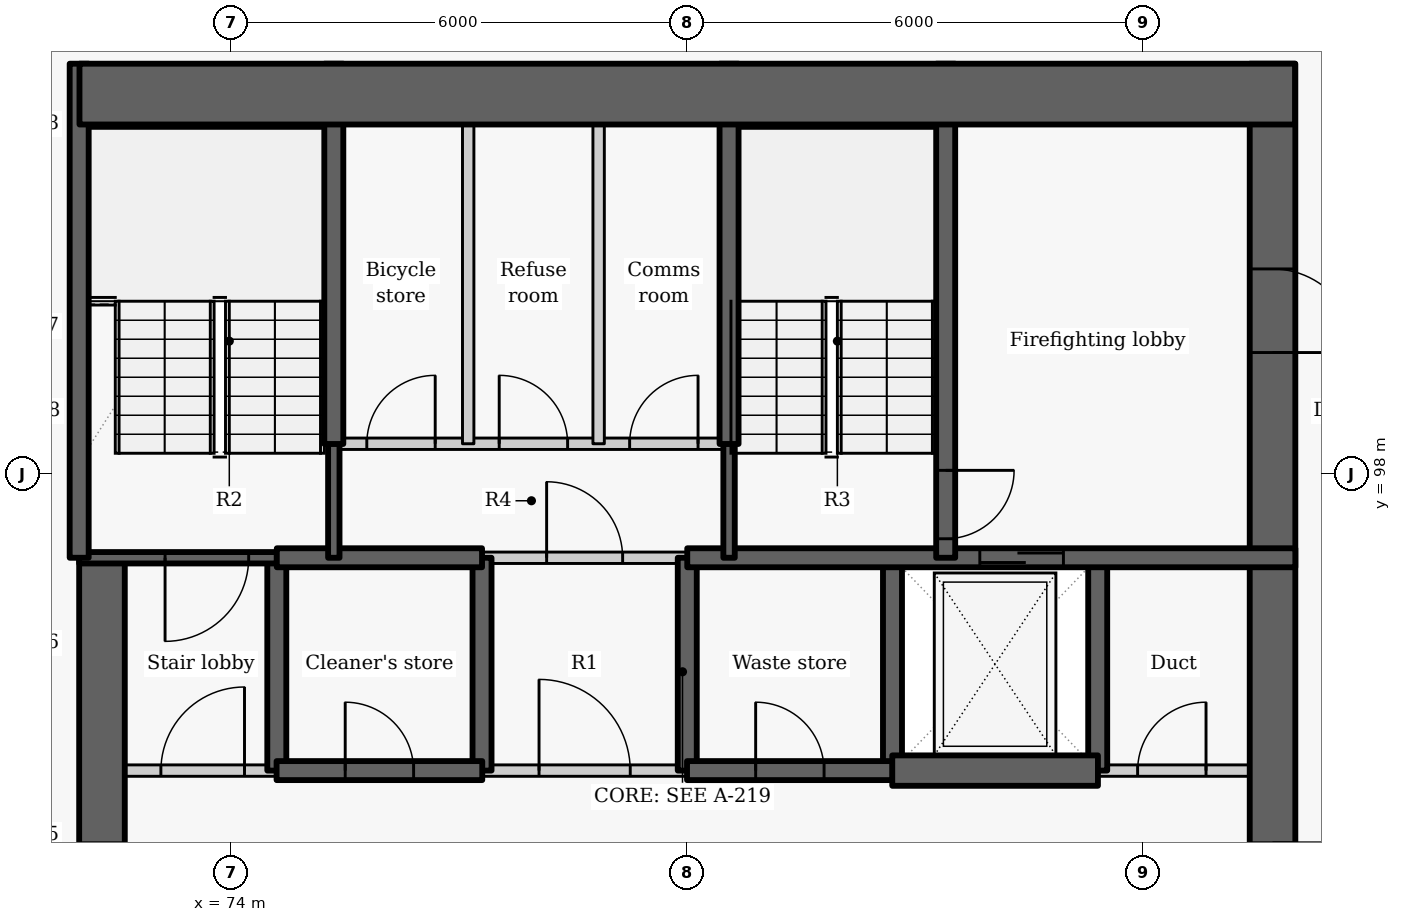
"""IFC4 building model, lengths in metres.
Left out: names, types, materials, properties, quantities, classifications, styles, units other than length and angle.
Written with IfcOpenShell. Run it as: python <this file> out.ifc"""

import sys

from ifc_helpers import new_model, si_unit, direction, frame, frame_2d, origin, place, context, subcontext, project, spatial, rectangle, extrude, element, fill, save


model = new_model("IFC4")
c1 = context("Model", 3, precision=1e-05, world=origin(), true_north=direction((0.0, 1.0)))
c2 = subcontext(c1, "Body", "Model", "MODEL_VIEW")
j1 = project(units=[si_unit("LENGTHUNIT", "METRE"), si_unit("PLANEANGLEUNIT", "RADIAN")], contexts=[c1])
p1 = place(None, origin())
s1 = spatial("IfcSite", under=j1, at=p1, CompositionType="ELEMENT")
p2 = place(p1, origin())
s2 = spatial("IfcBuilding", under=s1, at=p2, CompositionType="ELEMENT")
p3 = place(p2, frame((0.0, 0.0, 97.5)))
s3 = spatial("IfcBuildingStorey", under=s2, at=p3, CompositionType="ELEMENT", Elevation=97.5)
p4 = place(p3, frame((74.6, 94.1, -0.275), z_axis=(0.0, 0.0, 1.0), x_axis=(0.0, 1.0, 0.0)))
e1 = element("IfcWall", 1, at=p4, inside=s3, PredefinedType="SHEAR", context=c2, shape_type="SweptSolid", body=[
    extrude(rectangle(XDim=2.8, YDim=0.25, at=frame_2d((1.4, 0.0))), origin(), (0.0, 0.0, 1.0), 3.3),
])
p5 = place(p3, frame((72.3, 87.8, -0.275), z_axis=(0.0, 0.0, 1.0), x_axis=(0.0, 1.0, 0.0)))
e2 = element("IfcWall", 2, at=p5, inside=s3, PredefinedType="SHEAR", context=c2, shape_type="SweptSolid", body=[
    extrude(rectangle(XDim=9.1, YDim=0.6, at=frame_2d((4.55, 0.0))), origin(), (0.0, 0.0, 1.0), 3.3),
])
p6 = place(p5, frame((3.85, 0.0, 0.275)))
e3 = element("IfcOpeningElement", 3, at=p6, cuts=e2, PredefinedType="OPENING", context=c2, shape_type="SweptSolid", body=[
    extrude(rectangle(XDim=1.5, YDim=2.1, at=frame_2d((0.75, 1.05))), frame((0.0, 0.31, 0.0), z_axis=(0.0, -1.0, 0.0), x_axis=(1.0, 0.0, 0.0)), (0.0, 0.0, 1.0), 0.62),
])
for number, where, z_axis, x_axis in (
    (4, (77.3, 94.1, -0.275), (0.0, 0.0, 1.0), (0.0, 1.0, 0.0)),
    (5, (80.0, 94.1, -0.275), (0.0, 0.0, 1.0), (0.0, 1.0, 0.0)),
    (6, (82.7, 94.1, -0.275), (0.0, 0.0, 1.0), (0.0, 1.0, 0.0)),
    (7, (85.4, 94.1, -0.275), (0.0, 0.0, 1.0), (0.0, 1.0, 0.0)),
):
    element("IfcWall", number, at=place(p3, frame(where, z_axis=z_axis, x_axis=x_axis)), inside=s3, PredefinedType="SHEAR", context=c2, shape_type="SweptSolid", body=[
        extrude(rectangle(XDim=2.8, YDim=0.25, at=frame_2d((1.4, 0.0))), origin(), (0.0, 0.0, 1.0), 3.3),
    ])
p7 = place(p3, frame((87.7, 103.4, -0.275), z_axis=(0.0, 0.0, 1.0), x_axis=(0.0, -1.0, 0.0)))
e8 = element("IfcWall", 8, at=p7, inside=s3, PredefinedType="SHEAR", context=c2, shape_type="SweptSolid", body=[
    extrude(rectangle(XDim=15.6, YDim=0.6, at=frame_2d((7.8, 0.0))), origin(), (0.0, 0.0, 1.0), 3.3),
])
p8 = place(p7, frame((10.25, 0.0, 0.275)))
e9 = element("IfcOpeningElement", 9, at=p8, cuts=e8, PredefinedType="OPENING", context=c2, shape_type="SweptSolid", body=[
    extrude(rectangle(XDim=1.5, YDim=2.1, at=frame_2d((0.75, 1.05))), frame((0.0, 0.31, 0.0), z_axis=(0.0, -1.0, 0.0), x_axis=(1.0, 0.0, 0.0)), (0.0, 0.0, 1.0), 0.62),
])
p9 = place(p7, frame((2.7, 0.0, 0.275)))
e10 = element("IfcOpeningElement", 10, at=p9, cuts=e8, PredefinedType="OPENING", context=c2, shape_type="SweptSolid", body=[
    extrude(rectangle(XDim=1.1, YDim=2.1, at=frame_2d((0.55, 1.05))), frame((0.0, 0.31, 0.0), z_axis=(0.0, -1.0, 0.0), x_axis=(1.0, 0.0, 0.0)), (0.0, 0.0, 1.0), 0.62),
])
p10 = place(p3, frame((72.0, 94.1, 0.0), z_axis=(0.0, 0.0, 1.0), x_axis=(1.0, 0.0, 0.0)))
e11 = element("IfcWall", 11, at=p10, inside=s3, PredefinedType="PARTITIONING", context=c2, shape_type="SweptSolid", body=[
    extrude(rectangle(XDim=2.603, YDim=0.15, at=frame_2d((1.302, 0.0))), origin(), (0.0, 0.0, 1.0), 3.025),
])
p11 = place(p10, frame((1.075, 0.0, 0.0)))
e12 = element("IfcOpeningElement", 12, at=p11, cuts=e11, PredefinedType="OPENING", context=c2, shape_type="SweptSolid", body=[
    extrude(rectangle(XDim=1.1, YDim=2.1, at=frame_2d((0.55, 1.05))), frame((0.0, 0.085, 0.0), z_axis=(0.0, -1.0, 0.0), x_axis=(1.0, 0.0, 0.0)), (0.0, 0.0, 1.0), 0.17),
])
p12 = place(p3, frame((77.297, 94.1, 0.0), z_axis=(0.0, 0.0, 1.0), x_axis=(1.0, 0.0, 0.0)))
e13 = element("IfcWall", 13, at=p12, inside=s3, PredefinedType="PARTITIONING", context=c2, shape_type="SweptSolid", body=[
    extrude(rectangle(XDim=2.706, YDim=0.15, at=frame_2d((1.353, 0.0))), origin(), (0.0, 0.0, 1.0), 3.025),
])
p13 = place(p12, frame((0.753, 0.0, 0.0)))
e14 = element("IfcOpeningElement", 14, at=p13, cuts=e13, PredefinedType="OPENING", context=c2, shape_type="SweptSolid", body=[
    extrude(rectangle(XDim=1.2, YDim=2.1, at=frame_2d((0.6, 1.05))), frame((0.0, 0.085, 0.0), z_axis=(0.0, -1.0, 0.0), x_axis=(1.0, 0.0, 0.0)), (0.0, 0.0, 1.0), 0.17),
])
p14 = place(p3, frame((85.397, 94.1, 0.0), z_axis=(0.0, 0.0, 1.0), x_axis=(1.0, 0.0, 0.0)))
e15 = element("IfcWall", 15, at=p14, inside=s3, PredefinedType="PARTITIONING", context=c2, shape_type="SweptSolid", body=[
    extrude(rectangle(XDim=2.603, YDim=0.15, at=frame_2d((1.302, 0.0))), origin(), (0.0, 0.0, 1.0), 3.025),
])
p15 = place(p14, frame((0.528, 0.0, 0.0)))
e16 = element("IfcOpeningElement", 16, at=p15, cuts=e15, PredefinedType="OPENING", context=c2, shape_type="SweptSolid", body=[
    extrude(rectangle(XDim=0.9, YDim=2.1, at=frame_2d((0.45, 1.05))), frame((0.0, 0.085, 0.0), z_axis=(0.0, -1.0, 0.0), x_axis=(1.0, 0.0, 0.0)), (0.0, 0.0, 1.0), 0.17),
])
p16 = place(p3, frame((74.597, 94.1, -0.275), z_axis=(0.0, 0.0, 1.0), x_axis=(1.0, 0.0, 0.0)))
e17 = element("IfcWall", 17, at=p16, inside=s3, PredefinedType="SHEAR", context=c2, shape_type="SweptSolid", body=[
    extrude(rectangle(XDim=2.706, YDim=0.25, at=frame_2d((1.353, 0.0))), origin(), (0.0, 0.0, 1.0), 3.3),
])
p17 = place(p16, frame((0.903, 0.0, 0.275)))
e18 = element("IfcOpeningElement", 18, at=p17, cuts=e17, PredefinedType="OPENING", context=c2, shape_type="SweptSolid", body=[
    extrude(rectangle(XDim=0.9, YDim=2.1, at=frame_2d((0.45, 1.05))), frame((0.0, 0.135, 0.0), z_axis=(0.0, -1.0, 0.0), x_axis=(1.0, 0.0, 0.0)), (0.0, 0.0, 1.0), 0.27),
])
p18 = place(p3, frame((79.997, 94.1, -0.275), z_axis=(0.0, 0.0, 1.0), x_axis=(1.0, 0.0, 0.0)))
e19 = element("IfcWall", 19, at=p18, inside=s3, PredefinedType="SHEAR", context=c2, shape_type="SweptSolid", body=[
    extrude(rectangle(XDim=2.706, YDim=0.25, at=frame_2d((1.353, 0.0))), origin(), (0.0, 0.0, 1.0), 3.3),
])
p19 = place(p18, frame((0.903, 0.0, 0.275)))
e20 = element("IfcOpeningElement", 20, at=p19, cuts=e19, PredefinedType="OPENING", context=c2, shape_type="SweptSolid", body=[
    extrude(rectangle(XDim=0.9, YDim=2.1, at=frame_2d((0.45, 1.05))), frame((0.0, 0.135, 0.0), z_axis=(0.0, -1.0, 0.0), x_axis=(1.0, 0.0, 0.0)), (0.0, 0.0, 1.0), 0.27),
])
p20 = place(p3, frame((82.697, 94.1, -0.275), z_axis=(0.0, 0.0, 1.0), x_axis=(1.0, 0.0, 0.0)))
e21 = element("IfcWall", 21, at=p20, inside=s3, PredefinedType="SHEAR", context=c2, shape_type="SweptSolid", body=[
    extrude(rectangle(XDim=2.706, YDim=0.4, at=frame_2d((1.353, 0.0))), origin(), (0.0, 0.0, 1.0), 3.3),
])
p21 = place(p3, frame((74.6, 96.9, -0.275), z_axis=(0.0, 0.0, 1.0), x_axis=(-1.0, 0.0, 0.0)))
e22 = element("IfcWall", 22, at=p21, inside=s3, PredefinedType="SHEAR", context=c2, shape_type="SweptSolid", body=[
    extrude(rectangle(XDim=2.6, YDim=0.15, at=frame_2d((1.3, 0.0))), origin(), (0.0, 0.0, 1.0), 3.3),
])
p22 = place(p21, frame((0.37, 0.0, 0.275)))
e23 = element("IfcOpeningElement", 23, at=p22, cuts=e22, PredefinedType="OPENING", context=c2, shape_type="SweptSolid", body=[
    extrude(rectangle(XDim=1.1, YDim=2.1, at=frame_2d((0.55, 1.05))), frame((0.0, 0.085, 0.0), z_axis=(0.0, -1.0, 0.0), x_axis=(1.0, 0.0, 0.0)), (0.0, 0.0, 1.0), 0.17),
])
p23 = place(p3, frame((74.6, 96.9, -0.275), z_axis=(0.0, 0.0, 1.0), x_axis=(1.0, 0.0, 0.0)))
e24 = element("IfcWall", 24, at=p23, inside=s3, PredefinedType="SHEAR", context=c2, shape_type="SweptSolid", body=[
    extrude(rectangle(XDim=2.7, YDim=0.25, at=frame_2d((1.35, 0.0))), origin(), (0.0, 0.0, 1.0), 3.3),
])
p24 = place(p3, frame((80.0, 96.9, -0.275), z_axis=(0.0, 0.0, 1.0), x_axis=(1.0, 0.0, 0.0)))
e25 = element("IfcWall", 25, at=p24, inside=s3, PredefinedType="SHEAR", context=c2, shape_type="SweptSolid", body=[
    extrude(rectangle(XDim=8.0, YDim=0.25, at=frame_2d((4.0, 0.0))), origin(), (0.0, 0.0, 1.0), 3.3),
])
p25 = place(p24, frame((3.849, 0.0, 0.275)))
e26 = element("IfcOpeningElement", 26, at=p25, cuts=e25, PredefinedType="OPENING", context=c2, shape_type="SweptSolid", body=[
    extrude(rectangle(XDim=1.1, YDim=2.1, at=frame_2d((0.55, 1.05))), frame((0.0, 0.135, 0.0), z_axis=(0.0, -1.0, 0.0), x_axis=(1.0, 0.0, 0.0)), (0.0, 0.0, 1.0), 0.27),
])
p26 = place(p3, frame((77.3, 96.9, 0.0), z_axis=(0.0, 0.0, 1.0), x_axis=(1.0, 0.0, 0.0)))
e27 = element("IfcWall", 27, at=p26, inside=s3, PredefinedType="PARTITIONING", context=c2, shape_type="SweptSolid", body=[
    extrude(rectangle(XDim=2.7, YDim=0.15, at=frame_2d((1.35, 0.0))), origin(), (0.0, 0.0, 1.0), 3.025),
])
p27 = place(p26, frame((0.85, 0.0, 0.0)))
e28 = element("IfcOpeningElement", 28, at=p27, cuts=e27, PredefinedType="OPENING", context=c2, shape_type="SweptSolid", body=[
    extrude(rectangle(XDim=1.0, YDim=2.1, at=frame_2d((0.5, 1.05))), frame((0.0, 0.085, 0.0), z_axis=(0.0, -1.0, 0.0), x_axis=(1.0, 0.0, 0.0)), (0.0, 0.0, 1.0), 0.17),
])
p28 = place(p3, frame((75.35, 96.9, -0.275), z_axis=(0.0, 0.0, 1.0), x_axis=(0.0, 1.0, 0.0)))
e29 = element("IfcWall", 29, at=p28, inside=s3, PredefinedType="SHEAR", context=c2, shape_type="SweptSolid", body=[
    extrude(rectangle(XDim=1.503, YDim=0.15, at=frame_2d((0.751, 0.0))), origin(), (0.0, 0.0, 1.0), 3.3),
])
p29 = place(p3, frame((75.35, 98.397, -0.275), z_axis=(0.0, 0.0, 1.0), x_axis=(0.0, 1.0, 0.0)))
e30 = element("IfcWall", 30, at=p29, inside=s3, PredefinedType="SHEAR", context=c2, shape_type="SweptSolid", body=[
    extrude(rectangle(XDim=5.003, YDim=0.25, at=frame_2d((2.501, 0.0))), origin(), (0.0, 0.0, 1.0), 3.3),
])
p30 = place(p3, frame((72.0, 96.9, -0.275), z_axis=(0.0, 0.0, 1.0), x_axis=(0.0, 1.0, 0.0)))
e31 = element("IfcWall", 31, at=p30, inside=s3, PredefinedType="SHEAR", context=c2, shape_type="SweptSolid", body=[
    extrude(rectangle(XDim=6.5, YDim=0.25, at=frame_2d((3.25, 0.0))), origin(), (0.0, 0.0, 1.0), 3.3),
])
p31 = place(p3, frame((83.4, 103.4, -0.275), z_axis=(0.0, 0.0, 1.0), x_axis=(0.0, -1.0, 0.0)))
e32 = element("IfcWall", 32, at=p31, inside=s3, PredefinedType="SHEAR", context=c2, shape_type="SweptSolid", body=[
    extrude(rectangle(XDim=6.5, YDim=0.25, at=frame_2d((3.25, 0.0))), origin(), (0.0, 0.0, 1.0), 3.3),
])
p32 = place(p31, frame((5.35, 0.0, 0.275)))
e33 = element("IfcOpeningElement", 33, at=p32, cuts=e32, PredefinedType="OPENING", context=c2, shape_type="SweptSolid", body=[
    extrude(rectangle(XDim=0.9, YDim=2.1, at=frame_2d((0.45, 1.05))), frame((0.0, 0.135, 0.0), z_axis=(0.0, -1.0, 0.0), x_axis=(1.0, 0.0, 0.0)), (0.0, 0.0, 1.0), 0.27),
])
p33 = place(p3, frame((80.55, 96.9, -0.275), z_axis=(0.0, 0.0, 1.0), x_axis=(0.0, 1.0, 0.0)))
e34 = element("IfcWall", 34, at=p33, inside=s3, PredefinedType="SHEAR", context=c2, shape_type="SweptSolid", body=[
    extrude(rectangle(XDim=1.503, YDim=0.15, at=frame_2d((0.751, 0.0))), origin(), (0.0, 0.0, 1.0), 3.3),
])
p34 = place(p3, frame((80.55, 98.397, -0.275), z_axis=(0.0, 0.0, 1.0), x_axis=(0.0, 1.0, 0.0)))
e35 = element("IfcWall", 35, at=p34, inside=s3, PredefinedType="SHEAR", context=c2, shape_type="SweptSolid", body=[
    extrude(rectangle(XDim=5.003, YDim=0.25, at=frame_2d((2.501, 0.0))), origin(), (0.0, 0.0, 1.0), 3.3),
])
p35 = place(p3, frame((75.35, 98.4, 0.0), z_axis=(0.0, 0.0, 1.0), x_axis=(1.0, 0.0, 0.0)))
e36 = element("IfcWall", 36, at=p35, inside=s3, PredefinedType="PARTITIONING", context=c2, shape_type="SweptSolid", body=[
    extrude(rectangle(XDim=5.2, YDim=0.15, at=frame_2d((2.6, 0.0))), origin(), (0.0, 0.0, 1.0), 3.025),
])
p36 = place(p35, frame((0.434, 0.0, 0.0)))
e37 = element("IfcOpeningElement", 37, at=p36, cuts=e36, PredefinedType="OPENING", context=c2, shape_type="SweptSolid", body=[
    extrude(rectangle(XDim=0.9, YDim=2.1, at=frame_2d((0.45, 1.05))), frame((0.0, 0.085, 0.0), z_axis=(0.0, -1.0, 0.0), x_axis=(1.0, 0.0, 0.0)), (0.0, 0.0, 1.0), 0.17),
])
p37 = place(p35, frame((2.176, 0.0, 0.0)))
e38 = element("IfcOpeningElement", 38, at=p37, cuts=e36, PredefinedType="OPENING", context=c2, shape_type="SweptSolid", body=[
    extrude(rectangle(XDim=0.9, YDim=2.1, at=frame_2d((0.45, 1.05))), frame((0.0, 0.085, 0.0), z_axis=(0.0, -1.0, 0.0), x_axis=(1.0, 0.0, 0.0)), (0.0, 0.0, 1.0), 0.17),
])
p38 = place(p35, frame((3.892, 0.0, 0.0)))
e39 = element("IfcOpeningElement", 39, at=p38, cuts=e36, PredefinedType="OPENING", context=c2, shape_type="SweptSolid", body=[
    extrude(rectangle(XDim=0.9, YDim=2.1, at=frame_2d((0.45, 1.05))), frame((0.0, 0.085, 0.0), z_axis=(0.0, -1.0, 0.0), x_axis=(1.0, 0.0, 0.0)), (0.0, 0.0, 1.0), 0.17),
])
for number, where, z_axis, x_axis in (
    (40, (77.118, 98.4, 0.0), (0.0, 0.0, 1.0), (0.0, 1.0, 0.0)),
    (41, (78.834, 98.4, 0.0), (0.0, 0.0, 1.0), (0.0, 1.0, 0.0)),
):
    element("IfcWall", number, at=place(p3, frame(where, z_axis=z_axis, x_axis=x_axis)), inside=s3, PredefinedType="PARTITIONING", context=c2, shape_type="SweptSolid", body=[
        extrude(rectangle(XDim=5.0, YDim=0.15, at=frame_2d((2.5, 0.0))), origin(), (0.0, 0.0, 1.0), 3.025),
    ])
p39 = place(p3, frame((72.004, 103.0, -0.275), z_axis=(0.0, 0.0, 1.0), x_axis=(1.0, 0.0, 0.0)))
e42 = element("IfcWall", 42, at=p39, inside=s3, PredefinedType="SHEAR", context=c2, shape_type="SweptSolid", body=[
    extrude(rectangle(XDim=15.992, YDim=0.8, at=frame_2d((7.996, 0.0))), origin(), (0.0, 0.0, 1.0), 3.3),
])
p40 = place(p11, origin())
e43 = element("IfcDoor", 43, at=p40, inside=s3, OperationType="SINGLE_SWING_RIGHT", PredefinedType="DOOR", context=c2, shape_type="SweptSolid", body=[
    extrude(rectangle(XDim=1.1, YDim=2.1, at=frame_2d((0.55, 1.05))), frame((0.0, 0.025, 0.0), z_axis=(0.0, -1.0, 0.0), x_axis=(1.0, 0.0, 0.0)), (0.0, 0.0, 1.0), 0.05),
])
fill(e12, e43)
p41 = place(p17, origin())
e44 = element("IfcDoor", 44, at=p41, inside=s3, OperationType="SINGLE_SWING_LEFT", PredefinedType="DOOR", context=c2, shape_type="SweptSolid", body=[
    extrude(rectangle(XDim=0.9, YDim=2.1, at=frame_2d((0.45, 1.05))), frame((0.0, 0.025, 0.0), z_axis=(0.0, -1.0, 0.0), x_axis=(1.0, 0.0, 0.0)), (0.0, 0.0, 1.0), 0.05),
])
fill(e18, e44)
p42 = place(p13, origin())
e45 = element("IfcDoor", 45, at=p42, inside=s3, OperationType="DOUBLE_DOOR_SINGLE_SWING", PredefinedType="DOOR", context=c2, shape_type="SweptSolid", body=[
    extrude(rectangle(XDim=1.2, YDim=2.1, at=frame_2d((0.6, 1.05))), frame((0.0, 0.025, 0.0), z_axis=(0.0, -1.0, 0.0), x_axis=(1.0, 0.0, 0.0)), (0.0, 0.0, 1.0), 0.05),
])
fill(e14, e45)
p43 = place(p19, origin())
e46 = element("IfcDoor", 46, at=p43, inside=s3, OperationType="SINGLE_SWING_LEFT", PredefinedType="DOOR", context=c2, shape_type="SweptSolid", body=[
    extrude(rectangle(XDim=0.9, YDim=2.1, at=frame_2d((0.45, 1.05))), frame((0.0, 0.025, 0.0), z_axis=(0.0, -1.0, 0.0), x_axis=(1.0, 0.0, 0.0)), (0.0, 0.0, 1.0), 0.05),
])
fill(e20, e46)
p44 = place(p25, origin())
e47 = element("IfcDoor", 47, at=p44, inside=s3, OperationType="SLIDING_TO_LEFT", PredefinedType="DOOR", context=c2, shape_type="SweptSolid", body=[
    extrude(rectangle(XDim=1.1, YDim=2.1, at=frame_2d((0.55, 1.05))), frame((0.0, 0.025, 0.0), z_axis=(0.0, -1.0, 0.0), x_axis=(1.0, 0.0, 0.0)), (0.0, 0.0, 1.0), 0.05),
])
fill(e26, e47)
p45 = place(p15, origin())
e48 = element("IfcDoor", 48, at=p45, inside=s3, OperationType="SINGLE_SWING_RIGHT", PredefinedType="DOOR", context=c2, shape_type="SweptSolid", body=[
    extrude(rectangle(XDim=0.9, YDim=2.1, at=frame_2d((0.45, 1.05))), frame((0.0, 0.025, 0.0), z_axis=(0.0, -1.0, 0.0), x_axis=(1.0, 0.0, 0.0)), (0.0, 0.0, 1.0), 0.05),
])
fill(e16, e48)
p46 = place(p27, origin())
e49 = element("IfcDoor", 49, at=p46, inside=s3, OperationType="SINGLE_SWING_LEFT", PredefinedType="DOOR", context=c2, shape_type="SweptSolid", body=[
    extrude(rectangle(XDim=1.0, YDim=2.1, at=frame_2d((0.5, 1.05))), frame((0.0, 0.025, 0.0), z_axis=(0.0, -1.0, 0.0), x_axis=(1.0, 0.0, 0.0)), (0.0, 0.0, 1.0), 0.05),
])
fill(e28, e49)
p47 = place(p36, origin())
e50 = element("IfcDoor", 50, at=p47, inside=s3, OperationType="SINGLE_SWING_RIGHT", PredefinedType="DOOR", context=c2, shape_type="SweptSolid", body=[
    extrude(rectangle(XDim=0.9, YDim=2.1, at=frame_2d((0.45, 1.05))), frame((0.0, 0.025, 0.0), z_axis=(0.0, -1.0, 0.0), x_axis=(1.0, 0.0, 0.0)), (0.0, 0.0, 1.0), 0.05),
])
fill(e37, e50)
p48 = place(p37, origin())
e51 = element("IfcDoor", 51, at=p48, inside=s3, OperationType="SINGLE_SWING_LEFT", PredefinedType="DOOR", context=c2, shape_type="SweptSolid", body=[
    extrude(rectangle(XDim=0.9, YDim=2.1, at=frame_2d((0.45, 1.05))), frame((0.0, 0.025, 0.0), z_axis=(0.0, -1.0, 0.0), x_axis=(1.0, 0.0, 0.0)), (0.0, 0.0, 1.0), 0.05),
])
fill(e38, e51)
p49 = place(p38, origin())
e52 = element("IfcDoor", 52, at=p49, inside=s3, OperationType="SINGLE_SWING_RIGHT", PredefinedType="DOOR", context=c2, shape_type="SweptSolid", body=[
    extrude(rectangle(XDim=0.9, YDim=2.1, at=frame_2d((0.45, 1.05))), frame((0.0, 0.025, 0.0), z_axis=(0.0, -1.0, 0.0), x_axis=(1.0, 0.0, 0.0)), (0.0, 0.0, 1.0), 0.05),
])
fill(e39, e52)
p50 = place(p22, origin())
e53 = element("IfcDoor", 53, at=p50, inside=s3, OperationType="SINGLE_SWING_RIGHT", PredefinedType="DOOR", context=c2, shape_type="SweptSolid", body=[
    extrude(rectangle(XDim=1.1, YDim=2.1, at=frame_2d((0.55, 1.05))), frame((0.0, 0.025, 0.0), z_axis=(0.0, -1.0, 0.0), x_axis=(1.0, 0.0, 0.0)), (0.0, 0.0, 1.0), 0.05),
])
fill(e23, e53)
p51 = place(p32, origin())
e54 = element("IfcDoor", 54, at=p51, inside=s3, OperationType="SINGLE_SWING_LEFT", PredefinedType="DOOR", context=c2, shape_type="SweptSolid", body=[
    extrude(rectangle(XDim=0.9, YDim=2.1, at=frame_2d((0.45, 1.05))), frame((0.0, 0.025, 0.0), z_axis=(0.0, -1.0, 0.0), x_axis=(1.0, 0.0, 0.0)), (0.0, 0.0, 1.0), 0.05),
])
fill(e33, e54)
p52 = place(p6, origin())
e55 = element("IfcDoor", 55, at=p52, inside=s3, OperationType="DOUBLE_DOOR_SINGLE_SWING", PredefinedType="DOOR", context=c2, shape_type="SweptSolid", body=[
    extrude(rectangle(XDim=1.5, YDim=2.1, at=frame_2d((0.75, 1.05))), frame((0.0, 0.025, 0.0), z_axis=(0.0, -1.0, 0.0), x_axis=(1.0, 0.0, 0.0)), (0.0, 0.0, 1.0), 0.05),
])
fill(e3, e55)
p53 = place(p9, origin())
e56 = element("IfcDoor", 56, at=p53, inside=s3, OperationType="SINGLE_SWING_RIGHT", PredefinedType="DOOR", context=c2, shape_type="SweptSolid", body=[
    extrude(rectangle(XDim=1.1, YDim=2.1, at=frame_2d((0.55, 1.05))), frame((0.0, 0.025, 0.0), z_axis=(0.0, -1.0, 0.0), x_axis=(1.0, 0.0, 0.0)), (0.0, 0.0, 1.0), 0.05),
])
fill(e10, e56)
save(model, sys.argv[1])
